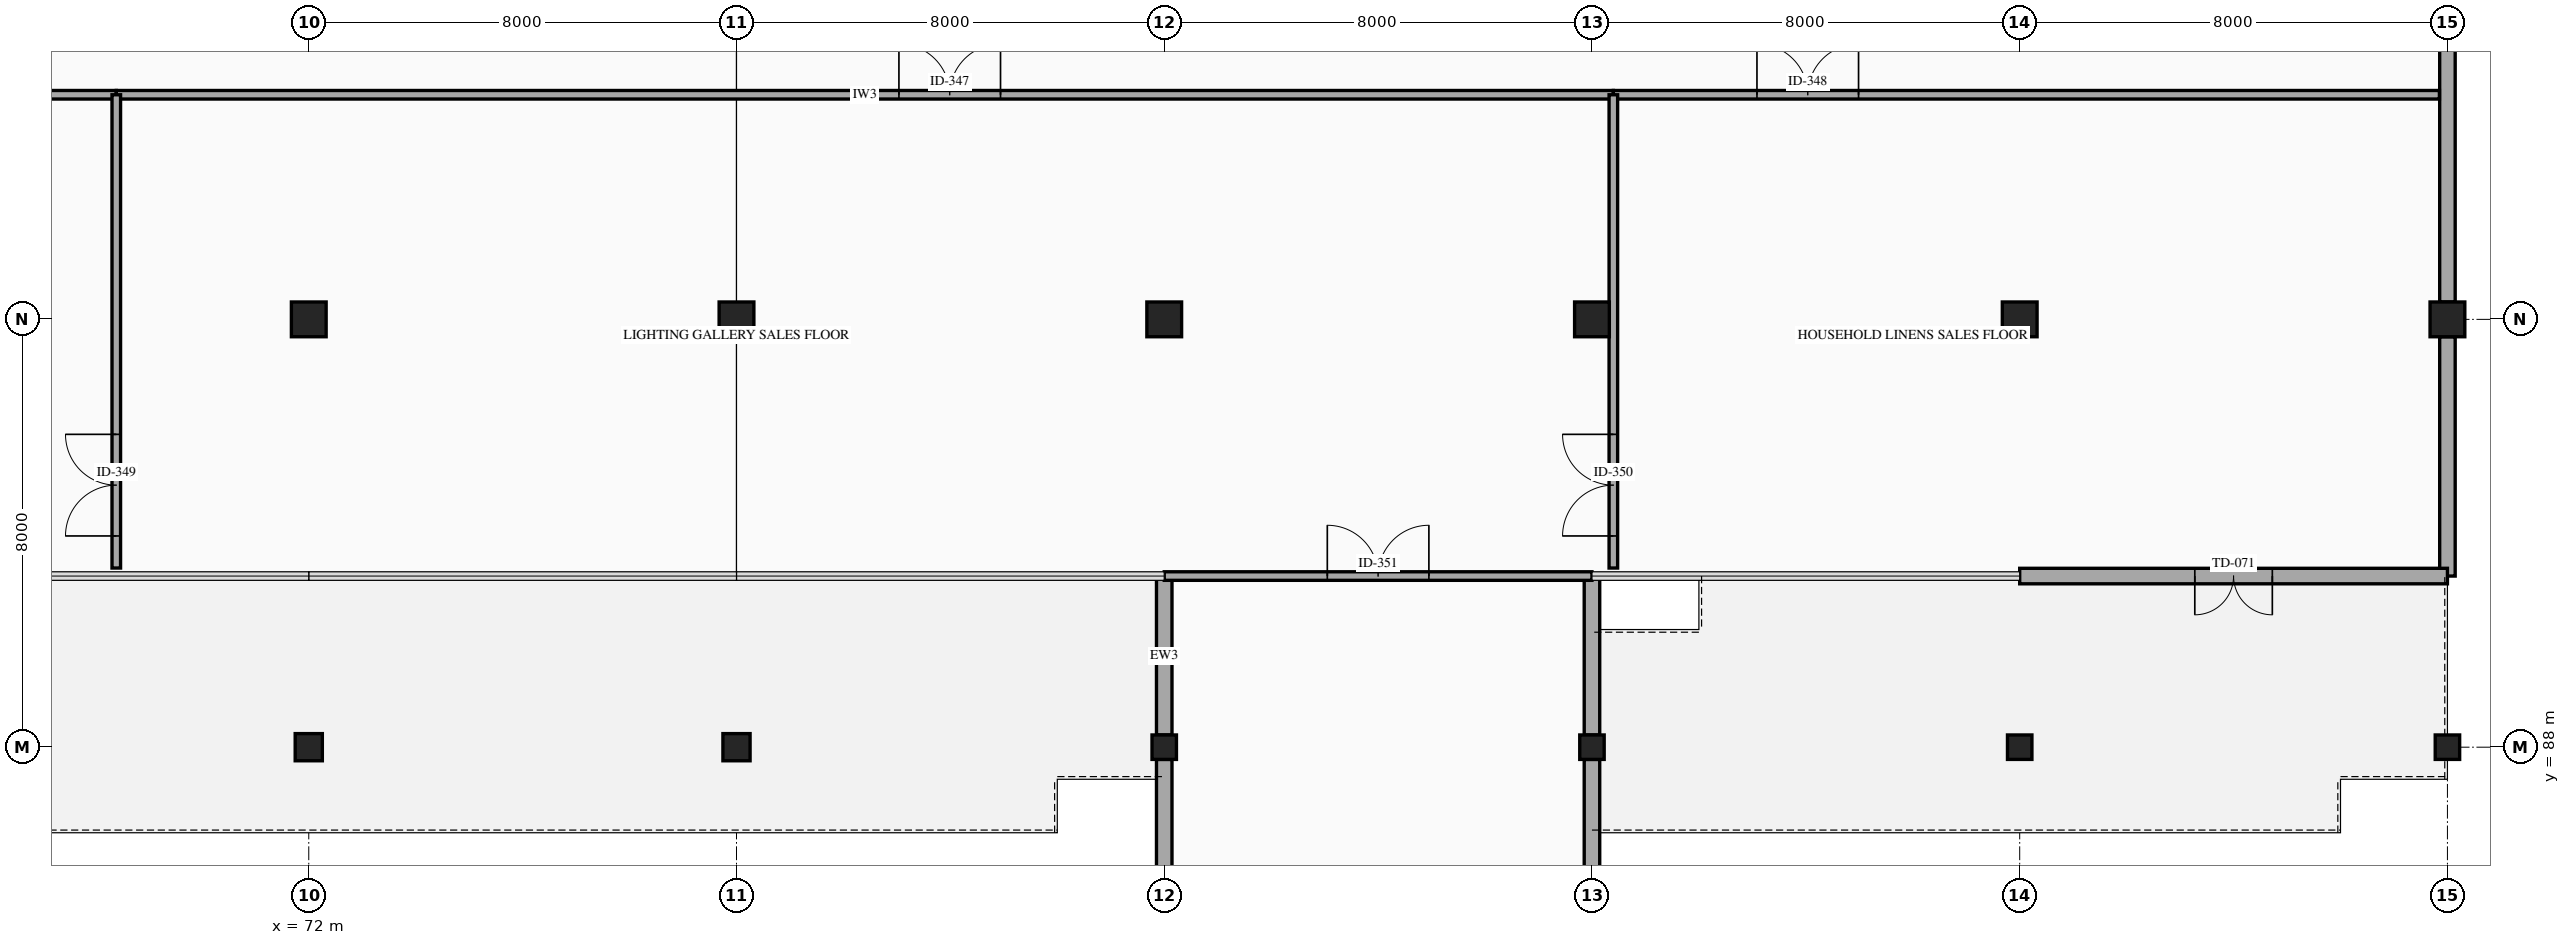
"""IFC4 building model, lengths in metres.
Left out: names, types, materials, properties, quantities, classifications, styles, units other than length and angle.
Written with IfcOpenShell. Run it as: python <this file> out.ifc"""

import sys

from ifc_helpers import new_model, si_unit, direction, frame, frame_2d, origin, origin_2d, place, context, subcontext, project, spatial, rectangle, hollow_circle, extrude, element, fill, save


model = new_model("IFC4")
c1 = context("Model", 3, precision=1e-05, world=origin(), true_north=direction((0.0, 1.0)))
c2 = subcontext(c1, "Body", "Model", "MODEL_VIEW")
j1 = project(units=[si_unit("LENGTHUNIT", "METRE"), si_unit("PLANEANGLEUNIT", "RADIAN")], contexts=[c1])
p1 = place(None, origin())
s1 = spatial("IfcSite", under=j1, at=p1, CompositionType="ELEMENT")
p2 = place(p1, origin())
s2 = spatial("IfcBuilding", under=s1, at=p2, CompositionType="ELEMENT")
p3 = place(p2, frame((0.0, 0.0, 19.4)))
s3 = spatial("IfcBuildingStorey", under=s2, at=p3, CompositionType="ELEMENT", Elevation=19.4)
p4 = place(p3, frame((72.0, 88.0, 0.0), z_axis=(0.0, 0.0, 1.0), x_axis=(1.0, 0.0, 0.0)))
e1 = element("IfcColumn", 1, at=p4, inside=s3, PredefinedType="COLUMN", context=c2, shape_type="SweptSolid", body=[
    extrude(hollow_circle(Radius=0.254, WallThickness=0.012, at=origin_2d()), origin(), (0.0, 0.0, 1.0), 4.5),
])
p5 = place(p3, frame((72.0, 96.0, 0.0), z_axis=(0.0, 0.0, 1.0), x_axis=(1.0, 0.0, 0.0)))
e2 = element("IfcColumn", 2, at=p5, inside=s3, PredefinedType="COLUMN", context=c2, shape_type="SweptSolid", body=[
    extrude(rectangle(XDim=0.65, YDim=0.65, at=origin_2d()), origin(), (0.0, 0.0, 1.0), 4.5),
])
p6 = place(p3, frame((80.0, 88.0, 0.0), z_axis=(0.0, 0.0, 1.0), x_axis=(1.0, 0.0, 0.0)))
e3 = element("IfcColumn", 3, at=p6, inside=s3, PredefinedType="COLUMN", context=c2, shape_type="SweptSolid", body=[
    extrude(hollow_circle(Radius=0.254, WallThickness=0.012, at=origin_2d()), origin(), (0.0, 0.0, 1.0), 4.5),
])
p7 = place(p3, frame((80.0, 96.0, 0.0), z_axis=(0.0, 0.0, 1.0), x_axis=(1.0, 0.0, 0.0)))
e4 = element("IfcColumn", 4, at=p7, inside=s3, PredefinedType="COLUMN", context=c2, shape_type="SweptSolid", body=[
    extrude(rectangle(XDim=0.65, YDim=0.65, at=origin_2d()), origin(), (0.0, 0.0, 1.0), 4.5),
])
p8 = place(p3, frame((88.0, 88.0, 0.0), z_axis=(0.0, 0.0, 1.0), x_axis=(1.0, 0.0, 0.0)))
e5 = element("IfcColumn", 5, at=p8, inside=s3, PredefinedType="COLUMN", context=c2, shape_type="SweptSolid", body=[
    extrude(hollow_circle(Radius=0.229, WallThickness=0.012, at=origin_2d()), origin(), (0.0, 0.0, 1.0), 4.5),
])
p9 = place(p3, frame((88.0, 96.0, 0.0), z_axis=(0.0, 0.0, 1.0), x_axis=(1.0, 0.0, 0.0)))
e6 = element("IfcColumn", 6, at=p9, inside=s3, PredefinedType="COLUMN", context=c2, shape_type="SweptSolid", body=[
    extrude(rectangle(XDim=0.65, YDim=0.65, at=origin_2d()), origin(), (0.0, 0.0, 1.0), 4.5),
])
p10 = place(p3, frame((96.0, 88.0, 0.0), z_axis=(0.0, 0.0, 1.0), x_axis=(1.0, 0.0, 0.0)))
e7 = element("IfcColumn", 7, at=p10, inside=s3, PredefinedType="COLUMN", context=c2, shape_type="SweptSolid", body=[
    extrude(hollow_circle(Radius=0.229, WallThickness=0.012, at=origin_2d()), origin(), (0.0, 0.0, 1.0), 4.5),
])
p11 = place(p3, frame((96.0, 96.0, 0.0), z_axis=(0.0, 0.0, 1.0), x_axis=(1.0, 0.0, 0.0)))
e8 = element("IfcColumn", 8, at=p11, inside=s3, PredefinedType="COLUMN", context=c2, shape_type="SweptSolid", body=[
    extrude(rectangle(XDim=0.65, YDim=0.65, at=origin_2d()), origin(), (0.0, 0.0, 1.0), 4.5),
])
p12 = place(p3, frame((104.0, 88.0, 0.0), z_axis=(0.0, 0.0, 1.0), x_axis=(1.0, 0.0, 0.0)))
e9 = element("IfcColumn", 9, at=p12, inside=s3, PredefinedType="COLUMN", context=c2, shape_type="SweptSolid", body=[
    extrude(hollow_circle(Radius=0.229, WallThickness=0.012, at=origin_2d()), origin(), (0.0, 0.0, 1.0), 4.5),
])
p13 = place(p3, frame((104.0, 96.0, 0.0), z_axis=(0.0, 0.0, 1.0), x_axis=(1.0, 0.0, 0.0)))
e10 = element("IfcColumn", 10, at=p13, inside=s3, PredefinedType="COLUMN", context=c2, shape_type="SweptSolid", body=[
    extrude(rectangle(XDim=0.65, YDim=0.65, at=origin_2d()), origin(), (0.0, 0.0, 1.0), 4.5),
])
p14 = place(p3, frame((112.0, 88.0, 0.0), z_axis=(0.0, 0.0, 1.0), x_axis=(1.0, 0.0, 0.0)))
e11 = element("IfcColumn", 11, at=p14, inside=s3, PredefinedType="COLUMN", context=c2, shape_type="SweptSolid", body=[
    extrude(hollow_circle(Radius=0.229, WallThickness=0.012, at=origin_2d()), origin(), (0.0, 0.0, 1.0), 4.5),
])
p15 = place(p3, frame((112.0, 96.0, 0.0), z_axis=(0.0, 0.0, 1.0), x_axis=(1.0, 0.0, 0.0)))
e12 = element("IfcColumn", 12, at=p15, inside=s3, PredefinedType="COLUMN", context=c2, shape_type="SweptSolid", body=[
    extrude(rectangle(XDim=0.65, YDim=0.65, at=origin_2d()), origin(), (0.0, 0.0, 1.0), 4.5),
])
p16 = place(p3, frame((88.0, 80.325, 0.0), z_axis=(0.0, 0.0, 1.0), x_axis=(0.0, 1.0, 0.0)))
e13 = element("IfcWall", 13, at=p16, inside=s3, PredefinedType="STANDARD", context=c2, shape_type="SweptSolid", body=[
    extrude(rectangle(XDim=7.447, YDim=0.29, at=frame_2d((3.723, 0.0))), origin(), (0.0, 0.0, 1.0), 3.48),
])
p17 = place(p16, frame((2.698, 0.0, 0.8)))
e14 = element("IfcOpeningElement", 14, at=p17, cuts=e13, PredefinedType="OPENING", context=c2, shape_type="SweptSolid", body=[
    extrude(rectangle(XDim=2.05, YDim=1.95, at=frame_2d((1.025, 0.975))), frame((0.0, 0.155, 0.0), z_axis=(0.0, -1.0, 0.0), x_axis=(1.0, 0.0, 0.0)), (0.0, 0.0, 1.0), 0.31),
])
p18 = place(p3, frame((88.0, 88.229, 0.0), z_axis=(0.0, 0.0, 1.0), x_axis=(0.0, 1.0, 0.0)))
e15 = element("IfcWall", 15, at=p18, inside=s3, PredefinedType="STANDARD", context=c2, shape_type="SweptSolid", body=[
    extrude(rectangle(XDim=2.971, YDim=0.29, at=frame_2d((1.486, 0.0))), origin(), (0.0, 0.0, 1.0), 3.48),
])
p19 = place(p3, frame((112.0, 103.675, 0.0), z_axis=(0.0, 0.0, 1.0), x_axis=(0.0, -1.0, 0.0)))
e16 = element("IfcWall", 16, at=p19, inside=s3, PredefinedType="STANDARD", context=c2, shape_type="SweptSolid", body=[
    extrude(rectangle(XDim=7.35, YDim=0.29, at=frame_2d((3.675, 0.0))), origin(), (0.0, 0.0, 1.0), 3.48),
])
p20 = place(p3, frame((112.0, 95.675, 0.0), z_axis=(0.0, 0.0, 1.0), x_axis=(0.0, -1.0, 0.0)))
e17 = element("IfcWall", 17, at=p20, inside=s3, PredefinedType="STANDARD", context=c2, shape_type="SweptSolid", body=[
    extrude(rectangle(XDim=4.475, YDim=0.29, at=frame_2d((2.238, 0.0))), origin(), (0.0, 0.0, 1.0), 3.48),
])
p21 = place(p3, frame((112.0, 91.2, 0.0), z_axis=(0.0, 0.0, 1.0), x_axis=(-1.0, 0.0, 0.0)))
e18 = element("IfcWall", 18, at=p21, inside=s3, PredefinedType="STANDARD", context=c2, shape_type="SweptSolid", body=[
    extrude(rectangle(XDim=8.0, YDim=0.29, at=frame_2d((4.0, 0.0))), origin(), (0.0, 0.0, 1.0), 3.48),
])
p22 = place(p21, frame((3.275, 0.0, 0.0)))
e19 = element("IfcOpeningElement", 19, at=p22, cuts=e18, PredefinedType="OPENING", context=c2, shape_type="SweptSolid", body=[
    extrude(rectangle(XDim=1.45, YDim=2.1, at=frame_2d((0.725, 1.05))), frame((0.0, 0.155, 0.0), z_axis=(0.0, -1.0, 0.0), x_axis=(1.0, 0.0, 0.0)), (0.0, 0.0, 1.0), 0.31),
])
p23 = place(p3, frame((96.0, 91.2, 0.0), z_axis=(0.0, 0.0, 1.0), x_axis=(0.0, -1.0, 0.0)))
e20 = element("IfcWall", 20, at=p23, inside=s3, PredefinedType="STANDARD", context=c2, shape_type="SweptSolid", body=[
    extrude(rectangle(XDim=2.971, YDim=0.29, at=frame_2d((1.486, 0.0))), origin(), (0.0, 0.0, 1.0), 3.48),
])
p24 = place(p3, frame((96.0, 87.771, 0.0), z_axis=(0.0, 0.0, 1.0), x_axis=(0.0, -1.0, 0.0)))
e21 = element("IfcWall", 21, at=p24, inside=s3, PredefinedType="STANDARD", context=c2, shape_type="SweptSolid", body=[
    extrude(rectangle(XDim=7.447, YDim=0.29, at=frame_2d((3.723, 0.0))), origin(), (0.0, 0.0, 1.0), 3.48),
])
p25 = place(p24, frame((2.698, 0.0, 0.8)))
e22 = element("IfcOpeningElement", 22, at=p25, cuts=e21, PredefinedType="OPENING", context=c2, shape_type="SweptSolid", body=[
    extrude(rectangle(XDim=2.05, YDim=1.95, at=frame_2d((1.025, 0.975))), frame((0.0, 0.155, 0.0), z_axis=(0.0, -1.0, 0.0), x_axis=(1.0, 0.0, 0.0)), (0.0, 0.0, 1.0), 0.31),
])
p26 = place(p3, frame((48.0, 100.2, 0.0), z_axis=(0.0, 0.0, 1.0), x_axis=(1.0, 0.0, 0.0)))
e23 = element("IfcWall", 23, at=p26, inside=s3, PredefinedType="PARTITIONING", context=c2, shape_type="SweptSolid", body=[
    extrude(rectangle(XDim=20.4, YDim=0.16, at=frame_2d((10.2, 0.0))), origin(), (0.0, 0.0, 1.0), 3.48),
])
p27 = place(p26, frame((11.091, 0.0, 0.0)))
e24 = element("IfcOpeningElement", 24, at=p27, cuts=e23, PredefinedType="OPENING", context=c2, shape_type="SweptSolid", body=[
    extrude(rectangle(XDim=1.9, YDim=2.3, at=frame_2d((0.95, 1.15))), frame((0.0, 0.09, 0.0), z_axis=(0.0, -1.0, 0.0), x_axis=(1.0, 0.0, 0.0)), (0.0, 0.0, 1.0), 0.18),
])
p28 = place(p3, frame((68.4, 100.2, 0.0), z_axis=(0.0, 0.0, 1.0), x_axis=(1.0, 0.0, 0.0)))
e25 = element("IfcWall", 25, at=p28, inside=s3, PredefinedType="PARTITIONING", context=c2, shape_type="SweptSolid", body=[
    extrude(rectangle(XDim=28.0, YDim=0.16, at=frame_2d((14.0, 0.0))), origin(), (0.0, 0.0, 1.0), 3.48),
])
p29 = place(p28, frame((14.638, 0.0, 0.0)))
e26 = element("IfcOpeningElement", 26, at=p29, cuts=e25, PredefinedType="OPENING", context=c2, shape_type="SweptSolid", body=[
    extrude(rectangle(XDim=1.9, YDim=2.3, at=frame_2d((0.95, 1.15))), frame((0.0, 0.09, 0.0), z_axis=(0.0, -1.0, 0.0), x_axis=(1.0, 0.0, 0.0)), (0.0, 0.0, 1.0), 0.18),
])
p30 = place(p3, frame((96.4, 100.2, 0.0), z_axis=(0.0, 0.0, 1.0), x_axis=(1.0, 0.0, 0.0)))
e27 = element("IfcWall", 27, at=p30, inside=s3, PredefinedType="PARTITIONING", context=c2, shape_type="SweptSolid", body=[
    extrude(rectangle(XDim=15.45, YDim=0.16, at=frame_2d((7.725, 0.0))), origin(), (0.0, 0.0, 1.0), 3.48),
])
p31 = place(p30, frame((2.686, 0.0, 0.0)))
e28 = element("IfcOpeningElement", 28, at=p31, cuts=e27, PredefinedType="OPENING", context=c2, shape_type="SweptSolid", body=[
    extrude(rectangle(XDim=1.9, YDim=2.3, at=frame_2d((0.95, 1.15))), frame((0.0, 0.09, 0.0), z_axis=(0.0, -1.0, 0.0), x_axis=(1.0, 0.0, 0.0)), (0.0, 0.0, 1.0), 0.18),
])
p32 = place(p3, frame((68.4, 91.35, 0.0), z_axis=(0.0, 0.0, 1.0), x_axis=(0.0, 1.0, 0.0)))
e29 = element("IfcWall", 29, at=p32, inside=s3, PredefinedType="PARTITIONING", context=c2, shape_type="SweptSolid", body=[
    extrude(rectangle(XDim=8.85, YDim=0.16, at=frame_2d((4.425, 0.0))), origin(), (0.0, 0.0, 1.0), 3.48),
])
p33 = place(p32, frame((0.6, 0.0, 0.0)))
e30 = element("IfcOpeningElement", 30, at=p33, cuts=e29, PredefinedType="OPENING", context=c2, shape_type="SweptSolid", body=[
    extrude(rectangle(XDim=1.9, YDim=2.3, at=frame_2d((0.95, 1.15))), frame((0.0, 0.09, 0.0), z_axis=(0.0, -1.0, 0.0), x_axis=(1.0, 0.0, 0.0)), (0.0, 0.0, 1.0), 0.18),
])
p34 = place(p3, frame((96.4, 91.35, 0.0), z_axis=(0.0, 0.0, 1.0), x_axis=(0.0, 1.0, 0.0)))
e31 = element("IfcWall", 31, at=p34, inside=s3, PredefinedType="PARTITIONING", context=c2, shape_type="SweptSolid", body=[
    extrude(rectangle(XDim=8.85, YDim=0.16, at=frame_2d((4.425, 0.0))), origin(), (0.0, 0.0, 1.0), 3.48),
])
p35 = place(p34, frame((0.6, 0.0, 0.0)))
e32 = element("IfcOpeningElement", 32, at=p35, cuts=e31, PredefinedType="OPENING", context=c2, shape_type="SweptSolid", body=[
    extrude(rectangle(XDim=1.9, YDim=2.3, at=frame_2d((0.95, 1.15))), frame((0.0, 0.09, 0.0), z_axis=(0.0, -1.0, 0.0), x_axis=(1.0, 0.0, 0.0)), (0.0, 0.0, 1.0), 0.18),
])
p36 = place(p3, frame((88.0, 91.2, 0.0), z_axis=(0.0, 0.0, 1.0), x_axis=(1.0, 0.0, 0.0)))
e33 = element("IfcWall", 33, at=p36, inside=s3, PredefinedType="PARTITIONING", context=c2, shape_type="SweptSolid", body=[
    extrude(rectangle(XDim=8.0, YDim=0.16, at=frame_2d((4.0, 0.0))), origin(), (0.0, 0.0, 1.0), 3.48),
])
p37 = place(p36, frame((3.05, 0.0, 0.0)))
e34 = element("IfcOpeningElement", 34, at=p37, cuts=e33, PredefinedType="OPENING", context=c2, shape_type="SweptSolid", body=[
    extrude(rectangle(XDim=1.9, YDim=2.3, at=frame_2d((0.95, 1.15))), frame((0.0, 0.09, 0.0), z_axis=(0.0, -1.0, 0.0), x_axis=(1.0, 0.0, 0.0)), (0.0, 0.0, 1.0), 0.18),
])
p38 = place(p22, origin())
e35 = element("IfcDoor", 35, at=p38, inside=s3, OperationType="DOUBLE_DOOR_SINGLE_SWING", PredefinedType="DOOR", context=c2, shape_type="SweptSolid", body=[
    extrude(rectangle(XDim=1.45, YDim=2.1, at=frame_2d((0.725, 1.05))), frame((0.0, 0.025, 0.0), z_axis=(0.0, -1.0, 0.0), x_axis=(1.0, 0.0, 0.0)), (0.0, 0.0, 1.0), 0.05),
])
fill(e19, e35)
p39 = place(p29, origin())
e36 = element("IfcDoor", 36, at=p39, inside=s3, OperationType="DOUBLE_DOOR_SINGLE_SWING", PredefinedType="DOOR", context=c2, shape_type="SweptSolid", body=[
    extrude(rectangle(XDim=1.9, YDim=2.3, at=frame_2d((0.95, 1.15))), frame((0.0, 0.025, 0.0), z_axis=(0.0, -1.0, 0.0), x_axis=(1.0, 0.0, 0.0)), (0.0, 0.0, 1.0), 0.05),
])
fill(e26, e36)
p40 = place(p31, origin())
e37 = element("IfcDoor", 37, at=p40, inside=s3, OperationType="DOUBLE_DOOR_SINGLE_SWING", PredefinedType="DOOR", context=c2, shape_type="SweptSolid", body=[
    extrude(rectangle(XDim=1.9, YDim=2.3, at=frame_2d((0.95, 1.15))), frame((0.0, 0.025, 0.0), z_axis=(0.0, -1.0, 0.0), x_axis=(1.0, 0.0, 0.0)), (0.0, 0.0, 1.0), 0.05),
])
fill(e28, e37)
p41 = place(p33, origin())
e38 = element("IfcDoor", 38, at=p41, inside=s3, OperationType="DOUBLE_DOOR_SINGLE_SWING", PredefinedType="DOOR", context=c2, shape_type="SweptSolid", body=[
    extrude(rectangle(XDim=1.9, YDim=2.3, at=frame_2d((0.95, 1.15))), frame((0.0, 0.025, 0.0), z_axis=(0.0, -1.0, 0.0), x_axis=(1.0, 0.0, 0.0)), (0.0, 0.0, 1.0), 0.05),
])
fill(e30, e38)
p42 = place(p35, origin())
e39 = element("IfcDoor", 39, at=p42, inside=s3, OperationType="DOUBLE_DOOR_SINGLE_SWING", PredefinedType="DOOR", context=c2, shape_type="SweptSolid", body=[
    extrude(rectangle(XDim=1.9, YDim=2.3, at=frame_2d((0.95, 1.15))), frame((0.0, 0.025, 0.0), z_axis=(0.0, -1.0, 0.0), x_axis=(1.0, 0.0, 0.0)), (0.0, 0.0, 1.0), 0.05),
])
fill(e32, e39)
p43 = place(p37, origin())
e40 = element("IfcDoor", 40, at=p43, inside=s3, OperationType="DOUBLE_DOOR_SINGLE_SWING", PredefinedType="DOOR", context=c2, shape_type="SweptSolid", body=[
    extrude(rectangle(XDim=1.9, YDim=2.3, at=frame_2d((0.95, 1.15))), frame((0.0, 0.025, 0.0), z_axis=(0.0, -1.0, 0.0), x_axis=(1.0, 0.0, 0.0)), (0.0, 0.0, 1.0), 0.05),
])
fill(e34, e40)
save(model, sys.argv[1])
